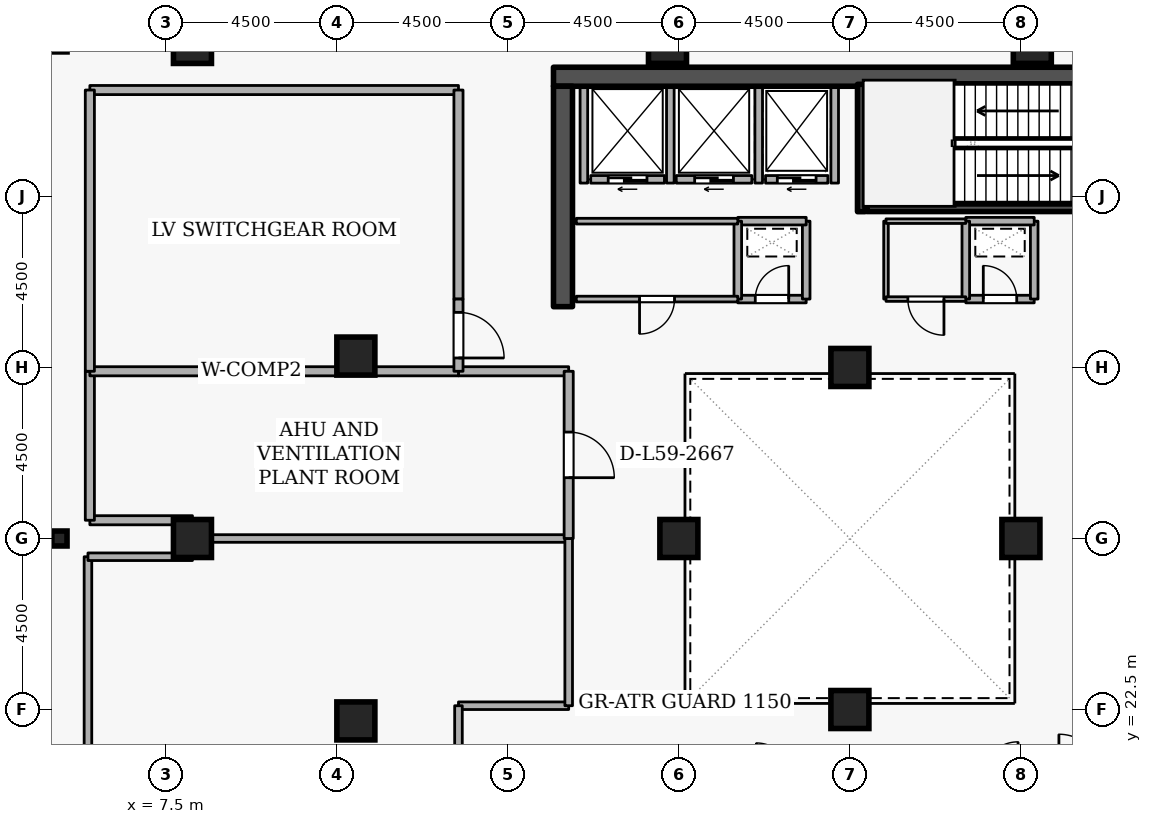
"""IFC4 building model, lengths in metres.
Left out: names, types, materials, properties, quantities, classifications, styles, units other than length and angle.
Written with IfcOpenShell. Run it as: python <this file> out.ifc"""

import sys

from ifc_helpers import new_model, si_unit, direction, frame, frame_2d, origin, origin_2d, place, context, subcontext, project, spatial, rectangle, i_section, extrude, element, fill, save


model = new_model("IFC4")
c1 = context("Model", 3, precision=1e-05, world=origin(), true_north=direction((0.0, 1.0)))
c2 = subcontext(c1, "Body", "Model", "MODEL_VIEW")
j1 = project(units=[si_unit("LENGTHUNIT", "METRE"), si_unit("PLANEANGLEUNIT", "RADIAN")], contexts=[c1])
p1 = place(None, origin())
s1 = spatial("IfcSite", under=j1, at=p1, CompositionType="ELEMENT")
p2 = place(p1, origin())
s2 = spatial("IfcBuilding", under=s1, at=p2, CompositionType="ELEMENT")
p3 = place(p2, frame((0.0, 0.0, 221.7)))
s3 = spatial("IfcBuildingStorey", under=s2, at=p3, CompositionType="ELEMENT", Elevation=221.7)
p4 = place(p3, frame((17.7, 39.15, 0.0), z_axis=(0.0, 0.0, 1.0), x_axis=(1.0, 0.0, 0.0)))
e1 = element("IfcWall", 1, at=p4, inside=s3, PredefinedType="SHEAR", context=c2, shape_type="SweptSolid", body=[
    extrude(rectangle(XDim=15.6, YDim=0.5, at=frame_2d((7.8, 0.0))), origin(), (0.0, 0.0, 1.0), 4.2),
])
p5 = place(p3, frame((17.95, 33.1, 0.0), z_axis=(0.0, 0.0, 1.0), x_axis=(0.0, 1.0, 0.0)))
e2 = element("IfcWall", 2, at=p5, inside=s3, PredefinedType="SHEAR", context=c2, shape_type="SweptSolid", body=[
    extrude(rectangle(XDim=5.8, YDim=0.5, at=frame_2d((2.9, 0.0))), origin(), (0.0, 0.0, 1.0), 4.2),
])
for number, where, z_axis, x_axis in (
    (3, (8.2, 27.0, 0.0), (0.0, 0.0, 1.0), (1.0, 0.0, 0.0)),
    (4, (8.2, 40.0, 0.0), (0.0, 0.0, 1.0), (1.0, 0.0, 0.0)),
    (5, (12.5, 22.2, 0.0), (0.0, 0.0, 1.0), (1.0, 0.0, 0.0)),
    (6, (12.5, 31.8, 0.0), (0.0, 0.0, 1.0), (1.0, 0.0, 0.0)),
    (7, (20.7, 40.0, 0.0), (0.0, 0.0, 1.0), (1.0, 0.0, 0.0)),
    (8, (30.3, 40.0, 0.0), (0.0, 0.0, 1.0), (1.0, 0.0, 0.0)),
    (9, (25.5, 22.5, 0.0), (0.0, 0.0, 1.0), (1.0, 0.0, 0.0)),
    (10, (25.5, 31.5, 0.0), (0.0, 0.0, 1.0), (1.0, 0.0, 0.0)),
    (11, (21.0, 27.0, 0.0), (0.0, 0.0, 1.0), (1.0, 0.0, 0.0)),
    (12, (30.0, 27.0, 0.0), (0.0, 0.0, 1.0), (1.0, 0.0, 0.0)),
):
    element("IfcColumn", number, at=place(p3, frame(where, z_axis=z_axis, x_axis=x_axis)), inside=s3, PredefinedType="COLUMN", context=c2, shape_type="SweptSolid", body=[
        extrude(rectangle(XDim=1.0, YDim=1.0, at=origin_2d()), origin(), (0.0, 0.0, 1.0), 4.2),
    ])
p6 = place(p3, frame((4.7, 27.0, 0.0), z_axis=(0.0, 0.0, 1.0), x_axis=(1.0, 0.0, 0.0)))
e13 = element("IfcColumn", 13, at=p6, inside=s3, PredefinedType="COLUMN", context=c2, shape_type="SweptSolid", body=[
    extrude(i_section(OverallWidth=0.399, OverallDepth=0.394, WebThickness=0.023, FlangeThickness=0.037, FilletRadius=0.015, at=origin_2d()), origin(), (0.0, 0.0, 1.0), 4.2),
])
p7 = place(p3, frame((24.92, 36.45, 0.0), z_axis=(0.0, 0.0, 1.0), x_axis=(-1.0, 0.0, 0.0)))
e14 = element("IfcWall", 14, at=p7, inside=s3, PredefinedType="STANDARD", context=c2, shape_type="SweptSolid", body=[
    extrude(rectangle(XDim=1.64, YDim=0.2, at=frame_2d((0.82, 0.0))), origin(), (0.0, 0.0, 1.0), 3.94),
])
p8 = place(p7, frame((0.31, 0.0, 0.0)))
e15 = element("IfcOpeningElement", 15, at=p8, cuts=e14, PredefinedType="OPENING", context=c2, shape_type="SweptSolid", body=[
    extrude(rectangle(XDim=1.02, YDim=2.06, at=frame_2d((0.51, 1.03))), frame((0.0, 0.11, 0.0), z_axis=(0.0, -1.0, 0.0), x_axis=(1.0, 0.0, 0.0)), (0.0, 0.0, 1.0), 0.22),
])
p9 = place(p3, frame((22.92, 36.45, 0.0), z_axis=(0.0, 0.0, 1.0), x_axis=(-1.0, 0.0, 0.0)))
e16 = element("IfcWall", 16, at=p9, inside=s3, PredefinedType="STANDARD", context=c2, shape_type="SweptSolid", body=[
    extrude(rectangle(XDim=1.99, YDim=0.2, at=frame_2d((0.995, 0.0))), origin(), (0.0, 0.0, 1.0), 3.94),
])
p10 = place(p9, frame((0.485, 0.0, 0.0)))
e17 = element("IfcOpeningElement", 17, at=p10, cuts=e16, PredefinedType="OPENING", context=c2, shape_type="SweptSolid", body=[
    extrude(rectangle(XDim=1.02, YDim=2.06, at=frame_2d((0.51, 1.03))), frame((0.0, 0.11, 0.0), z_axis=(0.0, -1.0, 0.0), x_axis=(1.0, 0.0, 0.0)), (0.0, 0.0, 1.0), 0.22),
])
p11 = place(p3, frame((20.62, 36.45, 0.0), z_axis=(0.0, 0.0, 1.0), x_axis=(-1.0, 0.0, 0.0)))
e18 = element("IfcWall", 18, at=p11, inside=s3, PredefinedType="STANDARD", context=c2, shape_type="SweptSolid", body=[
    extrude(rectangle(XDim=1.94, YDim=0.2, at=frame_2d((0.97, 0.0))), origin(), (0.0, 0.0, 1.0), 3.94),
])
p12 = place(p11, frame((0.46, 0.0, 0.0)))
e19 = element("IfcOpeningElement", 19, at=p12, cuts=e18, PredefinedType="OPENING", context=c2, shape_type="SweptSolid", body=[
    extrude(rectangle(XDim=1.02, YDim=2.06, at=frame_2d((0.51, 1.03))), frame((0.0, 0.11, 0.0), z_axis=(0.0, -1.0, 0.0), x_axis=(1.0, 0.0, 0.0)), (0.0, 0.0, 1.0), 0.22),
])
for number, where, z_axis, x_axis in (
    (20, (25.1, 36.352, 0.0), (0.0, 0.0, 1.0), (0.0, 1.0, 0.0)),
    (21, (23.1, 36.352, 0.0), (0.0, 0.0, 1.0), (0.0, 1.0, 0.0)),
    (22, (20.775, 36.352, 0.0), (0.0, 0.0, 1.0), (0.0, 1.0, 0.0)),
    (23, (18.5, 36.352, 0.0), (0.0, 0.0, 1.0), (0.0, 1.0, 0.0)),
):
    element("IfcWall", number, at=place(p3, frame(where, z_axis=z_axis, x_axis=x_axis)), inside=s3, PredefinedType="STANDARD", context=c2, shape_type="SweptSolid", body=[
        extrude(rectangle(XDim=2.536, YDim=0.2, at=frame_2d((1.268, 0.0))), origin(), (0.0, 0.0, 1.0), 3.94),
    ])
p13 = place(p3, frame((25.8, 35.6, 0.0), z_axis=(0.0, 0.0, 1.0), x_axis=(0.0, 1.0, 0.0)))
e24 = element("IfcWall", 24, at=p13, inside=s3, PredefinedType="SHEAR", context=c2, shape_type="SweptSolid", body=[
    extrude(rectangle(XDim=3.35, YDim=0.2, at=frame_2d((1.675, 0.0))), origin(), (0.0, 0.0, 1.0), 4.2),
])
p14 = place(p3, frame((25.95, 35.703, 0.0), z_axis=(0.0, 0.0, 1.0), x_axis=(1.0, 0.0, 0.0)))
e25 = element("IfcWall", 25, at=p14, inside=s3, PredefinedType="SHEAR", context=c2, shape_type="SweptSolid", body=[
    extrude(rectangle(XDim=7.1, YDim=0.2, at=frame_2d((3.55, 0.0))), origin(), (0.0, 0.0, 1.0), 4.2),
])
p15 = place(p3, frame((22.55, 33.3, 0.0), z_axis=(0.0, 0.0, 1.0), x_axis=(1.0, 0.0, 0.0)))
e26 = element("IfcWall", 26, at=p15, inside=s3, PredefinedType="STANDARD", context=c2, shape_type="SweptSolid", body=[
    extrude(rectangle(XDim=1.8, YDim=0.2, at=frame_2d((0.9, 0.0))), origin(), (0.0, 0.0, 1.0), 3.94),
])
p16 = place(p15, frame((0.46, 0.0, 0.0)))
e27 = element("IfcOpeningElement", 27, at=p16, cuts=e26, PredefinedType="OPENING", context=c2, shape_type="SweptSolid", body=[
    extrude(rectangle(XDim=0.88, YDim=2.04, at=frame_2d((0.44, 1.02))), frame((0.0, 0.11, 0.0), z_axis=(0.0, -1.0, 0.0), x_axis=(1.0, 0.0, 0.0)), (0.0, 0.0, 1.0), 0.22),
])
p17 = place(p3, frame((24.35, 33.3, 0.0), z_axis=(0.0, 0.0, 1.0), x_axis=(0.0, 1.0, 0.0)))
e28 = element("IfcWall", 28, at=p17, inside=s3, PredefinedType="STANDARD", context=c2, shape_type="SweptSolid", body=[
    extrude(rectangle(XDim=2.05, YDim=0.2, at=frame_2d((1.025, 0.0))), origin(), (0.0, 0.0, 1.0), 3.94),
])
p18 = place(p3, frame((24.35, 35.35, 0.0), z_axis=(0.0, 0.0, 1.0), x_axis=(-1.0, 0.0, 0.0)))
e29 = element("IfcWall", 29, at=p18, inside=s3, PredefinedType="STANDARD", context=c2, shape_type="SweptSolid", body=[
    extrude(rectangle(XDim=1.8, YDim=0.2, at=frame_2d((0.9, 0.0))), origin(), (0.0, 0.0, 1.0), 3.94),
])
p19 = place(p3, frame((22.55, 35.35, 0.0), z_axis=(0.0, 0.0, 1.0), x_axis=(0.0, -1.0, 0.0)))
e30 = element("IfcWall", 30, at=p19, inside=s3, PredefinedType="STANDARD", context=c2, shape_type="SweptSolid", body=[
    extrude(rectangle(XDim=2.05, YDim=0.2, at=frame_2d((1.025, 0.0))), origin(), (0.0, 0.0, 1.0), 3.94),
])
p20 = place(p3, frame((28.55, 33.3, 0.0), z_axis=(0.0, 0.0, 1.0), x_axis=(1.0, 0.0, 0.0)))
e31 = element("IfcWall", 31, at=p20, inside=s3, PredefinedType="STANDARD", context=c2, shape_type="SweptSolid", body=[
    extrude(rectangle(XDim=1.8, YDim=0.2, at=frame_2d((0.9, 0.0))), origin(), (0.0, 0.0, 1.0), 3.94),
])
p21 = place(p20, frame((0.46, 0.0, 0.0)))
e32 = element("IfcOpeningElement", 32, at=p21, cuts=e31, PredefinedType="OPENING", context=c2, shape_type="SweptSolid", body=[
    extrude(rectangle(XDim=0.88, YDim=2.04, at=frame_2d((0.44, 1.02))), frame((0.0, 0.11, 0.0), z_axis=(0.0, -1.0, 0.0), x_axis=(1.0, 0.0, 0.0)), (0.0, 0.0, 1.0), 0.22),
])
p22 = place(p3, frame((30.35, 33.3, 0.0), z_axis=(0.0, 0.0, 1.0), x_axis=(0.0, 1.0, 0.0)))
e33 = element("IfcWall", 33, at=p22, inside=s3, PredefinedType="STANDARD", context=c2, shape_type="SweptSolid", body=[
    extrude(rectangle(XDim=2.05, YDim=0.2, at=frame_2d((1.025, 0.0))), origin(), (0.0, 0.0, 1.0), 3.94),
])
p23 = place(p3, frame((30.35, 35.35, 0.0), z_axis=(0.0, 0.0, 1.0), x_axis=(-1.0, 0.0, 0.0)))
e34 = element("IfcWall", 34, at=p23, inside=s3, PredefinedType="STANDARD", context=c2, shape_type="SweptSolid", body=[
    extrude(rectangle(XDim=1.8, YDim=0.2, at=frame_2d((0.9, 0.0))), origin(), (0.0, 0.0, 1.0), 3.94),
])
p24 = place(p3, frame((28.55, 35.35, 0.0), z_axis=(0.0, 0.0, 1.0), x_axis=(0.0, -1.0, 0.0)))
e35 = element("IfcWall", 35, at=p24, inside=s3, PredefinedType="STANDARD", context=c2, shape_type="SweptSolid", body=[
    extrude(rectangle(XDim=2.05, YDim=0.2, at=frame_2d((1.025, 0.0))), origin(), (0.0, 0.0, 1.0), 3.94),
])
p25 = place(p3, frame((18.1, 22.6, 0.0), z_axis=(0.0, 0.0, 1.0), x_axis=(-1.0, 0.0, 0.0)))
e36 = element("IfcWall", 36, at=p25, inside=s3, PredefinedType="STANDARD", context=c2, shape_type="SweptSolid", body=[
    extrude(rectangle(XDim=2.9, YDim=0.2, at=frame_2d((1.45, 0.0))), origin(), (0.0, 0.0, 1.0), 3.94),
])
p26 = place(p3, frame((15.2, 22.6, 0.0), z_axis=(0.0, 0.0, 1.0), x_axis=(0.0, -1.0, 0.0)))
e37 = element("IfcWall", 37, at=p26, inside=s3, PredefinedType="STANDARD", context=c2, shape_type="SweptSolid", body=[
    extrude(rectangle(XDim=1.9, YDim=0.2, at=frame_2d((0.95, 0.0))), origin(), (0.0, 0.0, 1.0), 3.94),
])
p27 = place(p3, frame((5.45, 14.48, 0.0), z_axis=(0.0, 0.0, 1.0), x_axis=(0.0, 1.0, 0.0)))
e38 = element("IfcWall", 38, at=p27, inside=s3, PredefinedType="STANDARD", context=c2, shape_type="SweptSolid", body=[
    extrude(rectangle(XDim=12.04, YDim=0.2, at=frame_2d((6.02, 0.0))), origin(), (0.0, 0.0, 1.0), 3.94),
])
p28 = place(p3, frame((5.45, 26.52, 0.0), z_axis=(0.0, 0.0, 1.0), x_axis=(1.0, 0.0, 0.0)))
e39 = element("IfcWall", 39, at=p28, inside=s3, PredefinedType="STANDARD", context=c2, shape_type="SweptSolid", body=[
    extrude(rectangle(XDim=2.75, YDim=0.2, at=frame_2d((1.375, 0.0))), origin(), (0.0, 0.0, 1.0), 3.94),
])
p29 = place(p3, frame((8.2, 27.0, 0.0), z_axis=(0.0, 0.0, 1.0), x_axis=(1.0, 0.0, 0.0)))
e40 = element("IfcWall", 40, at=p29, inside=s3, PredefinedType="STANDARD", context=c2, shape_type="SweptSolid", body=[
    extrude(rectangle(XDim=9.9, YDim=0.2, at=frame_2d((4.95, 0.0))), origin(), (0.0, 0.0, 1.0), 3.325),
])
p30 = place(p3, frame((18.1, 27.0, 0.0), z_axis=(0.0, 0.0, 1.0), x_axis=(0.0, -1.0, 0.0)))
e41 = element("IfcWall", 41, at=p30, inside=s3, PredefinedType="STANDARD", context=c2, shape_type="SweptSolid", body=[
    extrude(rectangle(XDim=4.4, YDim=0.2, at=frame_2d((2.2, 0.0))), origin(), (0.0, 0.0, 1.0), 3.145),
])
p31 = place(p3, frame((15.2, 31.4, 0.0), z_axis=(0.0, 0.0, 1.0), x_axis=(1.0, 0.0, 0.0)))
e42 = element("IfcWall", 42, at=p31, inside=s3, PredefinedType="STANDARD", context=c2, shape_type="SweptSolid", body=[
    extrude(rectangle(XDim=2.9, YDim=0.24, at=frame_2d((1.45, 0.0))), origin(), (0.0, 0.0, 1.0), 3.94),
])
p32 = place(p3, frame((18.1, 31.4, 0.0), z_axis=(0.0, 0.0, 1.0), x_axis=(0.0, -1.0, 0.0)))
e43 = element("IfcWall", 43, at=p32, inside=s3, PredefinedType="STANDARD", context=c2, shape_type="SweptSolid", body=[
    extrude(rectangle(XDim=4.4, YDim=0.24, at=frame_2d((2.2, 0.0))), origin(), (0.0, 0.0, 1.0), 3.145),
])
p33 = place(p32, frame((1.6, 0.0, 0.0)))
e44 = element("IfcOpeningElement", 44, at=p33, cuts=e43, PredefinedType="OPENING", context=c2, shape_type="SweptSolid", body=[
    extrude(rectangle(XDim=1.2, YDim=2.1, at=frame_2d((0.6, 1.05))), frame((0.0, 0.13, 0.0), z_axis=(0.0, -1.0, 0.0), x_axis=(1.0, 0.0, 0.0)), (0.0, 0.0, 1.0), 0.26),
])
p34 = place(p3, frame((8.2, 27.48, 0.0), z_axis=(0.0, 0.0, 1.0), x_axis=(-1.0, 0.0, 0.0)))
e45 = element("IfcWall", 45, at=p34, inside=s3, PredefinedType="STANDARD", context=c2, shape_type="SweptSolid", body=[
    extrude(rectangle(XDim=2.7, YDim=0.24, at=frame_2d((1.35, 0.0))), origin(), (0.0, 0.0, 1.0), 3.94),
])
p35 = place(p3, frame((5.5, 27.48, 0.0), z_axis=(0.0, 0.0, 1.0), x_axis=(0.0, 1.0, 0.0)))
e46 = element("IfcWall", 46, at=p35, inside=s3, PredefinedType="STANDARD", context=c2, shape_type="SweptSolid", body=[
    extrude(rectangle(XDim=3.92, YDim=0.24, at=frame_2d((1.96, 0.0))), origin(), (0.0, 0.0, 1.0), 3.94),
])
for number, where, z_axis, x_axis in (
    (47, (5.5, 31.4, 0.0), (0.0, 0.0, 1.0), (1.0, 0.0, 0.0)),
    (48, (5.5, 38.8, 0.0), (0.0, 0.0, 1.0), (1.0, 0.0, 0.0)),
):
    element("IfcWall", number, at=place(p3, frame(where, z_axis=z_axis, x_axis=x_axis)), inside=s3, PredefinedType="STANDARD", context=c2, shape_type="SweptSolid", body=[
        extrude(rectangle(XDim=9.7, YDim=0.24, at=frame_2d((4.85, 0.0))), origin(), (0.0, 0.0, 1.0), 3.94),
    ])
p36 = place(p3, frame((15.2, 38.8, 0.0), z_axis=(0.0, 0.0, 1.0), x_axis=(0.0, -1.0, 0.0)))
e49 = element("IfcWall", 49, at=p36, inside=s3, PredefinedType="STANDARD", context=c2, shape_type="SweptSolid", body=[
    extrude(rectangle(XDim=5.5, YDim=0.24, at=frame_2d((2.75, 0.0))), origin(), (0.0, 0.0, 1.0), 3.94),
])
p37 = place(p3, frame((15.2, 33.3, 0.0), z_axis=(0.0, 0.0, 1.0), x_axis=(0.0, -1.0, 0.0)))
e50 = element("IfcWall", 50, at=p37, inside=s3, PredefinedType="STANDARD", context=c2, shape_type="SweptSolid", body=[
    extrude(rectangle(XDim=1.9, YDim=0.24, at=frame_2d((0.95, 0.0))), origin(), (0.0, 0.0, 1.0), 3.94),
])
p38 = place(p37, frame((0.35, 0.0, 0.0)))
e51 = element("IfcOpeningElement", 51, at=p38, cuts=e50, PredefinedType="OPENING", context=c2, shape_type="SweptSolid", body=[
    extrude(rectangle(XDim=1.2, YDim=2.1, at=frame_2d((0.6, 1.05))), frame((0.0, 0.13, 0.0), z_axis=(0.0, -1.0, 0.0), x_axis=(1.0, 0.0, 0.0)), (0.0, 0.0, 1.0), 0.26),
])
p39 = place(p3, frame((5.5, 31.4, 0.0), z_axis=(0.0, 0.0, 1.0), x_axis=(0.0, 1.0, 0.0)))
e52 = element("IfcWall", 52, at=p39, inside=s3, PredefinedType="STANDARD", context=c2, shape_type="SweptSolid", body=[
    extrude(rectangle(XDim=7.4, YDim=0.24, at=frame_2d((3.7, 0.0))), origin(), (0.0, 0.0, 1.0), 3.445),
])
p40 = place(p3, frame((18.3, 35.35, 0.0), z_axis=(0.0, 0.0, 1.0), x_axis=(1.0, 0.0, 0.0)))
e53 = element("IfcWall", 53, at=p40, inside=s3, PredefinedType="PARTITIONING", context=c2, shape_type="SweptSolid", body=[
    extrude(rectangle(XDim=4.25, YDim=0.15, at=frame_2d((2.125, 0.0))), origin(), (0.0, 0.0, 1.0), 3.94),
])
p41 = place(p3, frame((22.55, 33.3, 0.0), z_axis=(0.0, 0.0, 1.0), x_axis=(-1.0, 0.0, 0.0)))
e54 = element("IfcWall", 54, at=p41, inside=s3, PredefinedType="PARTITIONING", context=c2, shape_type="SweptSolid", body=[
    extrude(rectangle(XDim=4.25, YDim=0.15, at=frame_2d((2.125, 0.0))), origin(), (0.0, 0.0, 1.0), 3.94),
])
p42 = place(p41, frame((1.665, 0.0, 0.0)))
e55 = element("IfcOpeningElement", 55, at=p42, cuts=e54, PredefinedType="OPENING", context=c2, shape_type="SweptSolid", body=[
    extrude(rectangle(XDim=0.92, YDim=2.08, at=frame_2d((0.46, 1.04))), frame((0.0, 0.085, 0.0), z_axis=(0.0, -1.0, 0.0), x_axis=(1.0, 0.0, 0.0)), (0.0, 0.0, 1.0), 0.17),
])
p43 = place(p3, frame((26.45, 33.3, 0.0), z_axis=(0.0, 0.0, 1.0), x_axis=(0.0, 1.0, 0.0)))
e56 = element("IfcWall", 56, at=p43, inside=s3, PredefinedType="PARTITIONING", context=c2, shape_type="SweptSolid", body=[
    extrude(rectangle(XDim=2.05, YDim=0.12, at=frame_2d((1.025, 0.0))), origin(), (0.0, 0.0, 1.0), 3.94),
])
p44 = place(p3, frame((26.45, 35.35, 0.0), z_axis=(0.0, 0.0, 1.0), x_axis=(1.0, 0.0, 0.0)))
e57 = element("IfcWall", 57, at=p44, inside=s3, PredefinedType="PARTITIONING", context=c2, shape_type="SweptSolid", body=[
    extrude(rectangle(XDim=2.1, YDim=0.12, at=frame_2d((1.05, 0.0))), origin(), (0.0, 0.0, 1.0), 3.94),
])
p45 = place(p3, frame((28.55, 33.3, 0.0), z_axis=(0.0, 0.0, 1.0), x_axis=(-1.0, 0.0, 0.0)))
e58 = element("IfcWall", 58, at=p45, inside=s3, PredefinedType="PARTITIONING", context=c2, shape_type="SweptSolid", body=[
    extrude(rectangle(XDim=2.1, YDim=0.12, at=frame_2d((1.05, 0.0))), origin(), (0.0, 0.0, 1.0), 3.94),
])
p46 = place(p45, frame((0.575, 0.0, 0.0)))
e59 = element("IfcOpeningElement", 59, at=p46, cuts=e58, PredefinedType="OPENING", context=c2, shape_type="SweptSolid", body=[
    extrude(rectangle(XDim=0.95, YDim=2.1, at=frame_2d((0.475, 1.05))), frame((0.0, 0.07, 0.0), z_axis=(0.0, -1.0, 0.0), x_axis=(1.0, 0.0, 0.0)), (0.0, 0.0, 1.0), 0.14),
])
p47 = place(p8, origin())
e60 = element("IfcDoor", 60, at=p47, inside=s3, OperationType="SLIDING_TO_LEFT", PredefinedType="DOOR", context=c2, shape_type="SweptSolid", body=[
    extrude(rectangle(XDim=1.02, YDim=2.06, at=frame_2d((0.51, 1.03))), frame((0.0, 0.025, 0.0), z_axis=(0.0, -1.0, 0.0), x_axis=(1.0, 0.0, 0.0)), (0.0, 0.0, 1.0), 0.05),
])
fill(e15, e60)
p48 = place(p10, origin())
e61 = element("IfcDoor", 61, at=p48, inside=s3, OperationType="SLIDING_TO_LEFT", PredefinedType="DOOR", context=c2, shape_type="SweptSolid", body=[
    extrude(rectangle(XDim=1.02, YDim=2.06, at=frame_2d((0.51, 1.03))), frame((0.0, 0.025, 0.0), z_axis=(0.0, -1.0, 0.0), x_axis=(1.0, 0.0, 0.0)), (0.0, 0.0, 1.0), 0.05),
])
fill(e17, e61)
p49 = place(p12, origin())
e62 = element("IfcDoor", 62, at=p49, inside=s3, OperationType="SLIDING_TO_LEFT", PredefinedType="DOOR", context=c2, shape_type="SweptSolid", body=[
    extrude(rectangle(XDim=1.02, YDim=2.06, at=frame_2d((0.51, 1.03))), frame((0.0, 0.025, 0.0), z_axis=(0.0, -1.0, 0.0), x_axis=(1.0, 0.0, 0.0)), (0.0, 0.0, 1.0), 0.05),
])
fill(e19, e62)
p50 = place(p16, origin())
e63 = element("IfcDoor", 63, at=p50, inside=s3, OperationType="SINGLE_SWING_RIGHT", PredefinedType="DOOR", context=c2, shape_type="SweptSolid", body=[
    extrude(rectangle(XDim=0.88, YDim=2.04, at=frame_2d((0.44, 1.02))), frame((0.0, 0.025, 0.0), z_axis=(0.0, -1.0, 0.0), x_axis=(1.0, 0.0, 0.0)), (0.0, 0.0, 1.0), 0.05),
])
fill(e27, e63)
p51 = place(p21, origin())
e64 = element("IfcDoor", 64, at=p51, inside=s3, OperationType="SINGLE_SWING_LEFT", PredefinedType="DOOR", context=c2, shape_type="SweptSolid", body=[
    extrude(rectangle(XDim=0.88, YDim=2.04, at=frame_2d((0.44, 1.02))), frame((0.0, 0.025, 0.0), z_axis=(0.0, -1.0, 0.0), x_axis=(1.0, 0.0, 0.0)), (0.0, 0.0, 1.0), 0.05),
])
fill(e32, e64)
p52 = place(p42, origin())
e65 = element("IfcDoor", 65, at=p52, inside=s3, OperationType="SINGLE_SWING_RIGHT", PredefinedType="DOOR", context=c2, shape_type="SweptSolid", body=[
    extrude(rectangle(XDim=0.92, YDim=2.08, at=frame_2d((0.46, 1.04))), frame((0.0, 0.025, 0.0), z_axis=(0.0, -1.0, 0.0), x_axis=(1.0, 0.0, 0.0)), (0.0, 0.0, 1.0), 0.05),
])
fill(e55, e65)
p53 = place(p46, origin())
e66 = element("IfcDoor", 66, at=p53, inside=s3, OperationType="SINGLE_SWING_LEFT", PredefinedType="DOOR", context=c2, shape_type="SweptSolid", body=[
    extrude(rectangle(XDim=0.95, YDim=2.1, at=frame_2d((0.475, 1.05))), frame((0.0, 0.025, 0.0), z_axis=(0.0, -1.0, 0.0), x_axis=(1.0, 0.0, 0.0)), (0.0, 0.0, 1.0), 0.05),
])
fill(e59, e66)
p54 = place(p33, origin())
e67 = element("IfcDoor", 67, at=p54, inside=s3, OperationType="SINGLE_SWING_RIGHT", PredefinedType="DOOR", context=c2, shape_type="SweptSolid", body=[
    extrude(rectangle(XDim=1.2, YDim=2.1, at=frame_2d((0.6, 1.05))), frame((0.0, 0.025, 0.0), z_axis=(0.0, -1.0, 0.0), x_axis=(1.0, 0.0, 0.0)), (0.0, 0.0, 1.0), 0.05),
])
fill(e44, e67)
p55 = place(p38, origin())
e68 = element("IfcDoor", 68, at=p55, inside=s3, OperationType="SINGLE_SWING_RIGHT", PredefinedType="DOOR", context=c2, shape_type="SweptSolid", body=[
    extrude(rectangle(XDim=1.2, YDim=2.1, at=frame_2d((0.6, 1.05))), frame((0.0, 0.025, 0.0), z_axis=(0.0, -1.0, 0.0), x_axis=(1.0, 0.0, 0.0)), (0.0, 0.0, 1.0), 0.05),
])
fill(e51, e68)
save(model, sys.argv[1])
